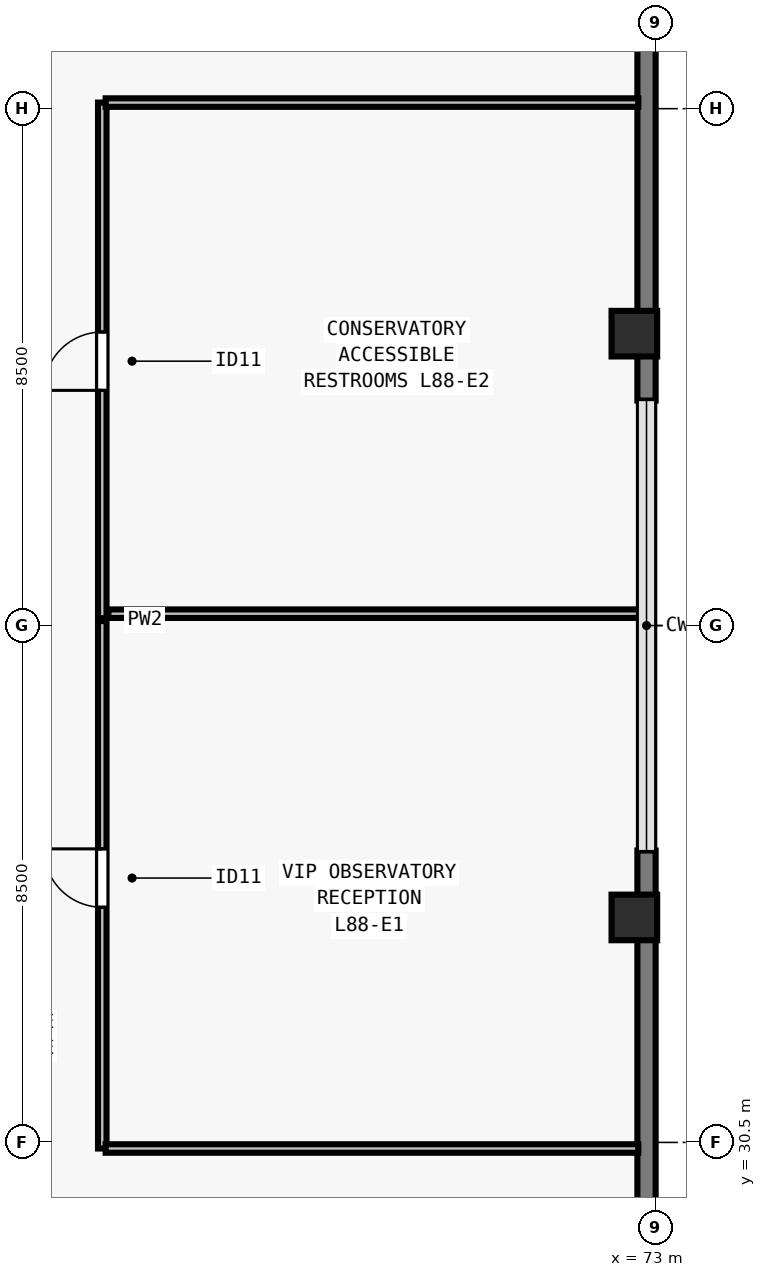
"""IFC4 building model, lengths in metres.
Left out: names, types, materials, properties, quantities, classifications, styles, units other than length and angle.
Written with IfcOpenShell. Run it as: python <this file> out.ifc"""

import sys

from ifc_helpers import new_model, si_unit, direction, frame, frame_2d, origin, origin_2d, place, context, subcontext, project, spatial, rectangle, extrude, element, fill, save


model = new_model("IFC4")
c1 = context("Model", 3, precision=1e-05, world=origin(), true_north=direction((0.0, 1.0)))
c2 = subcontext(c1, "Body", "Model", "MODEL_VIEW")
j1 = project(units=[si_unit("LENGTHUNIT", "METRE"), si_unit("PLANEANGLEUNIT", "RADIAN")], contexts=[c1])
p1 = place(None, origin())
s1 = spatial("IfcSite", under=j1, at=p1, CompositionType="ELEMENT")
p2 = place(p1, origin())
s2 = spatial("IfcBuilding", under=s1, at=p2, CompositionType="ELEMENT")
p3 = place(p2, frame((0.0, 0.0, 320.0)))
s3 = spatial("IfcBuildingStorey", under=s2, at=p3, CompositionType="ELEMENT", Elevation=320.0)
for number, where, z_axis, x_axis in (
    (1, (72.65, 34.2, 0.0), (0.0, 0.0, 1.0), (0.0, 1.0, 0.0)),
    (2, (72.65, 43.8, 0.0), (0.0, 0.0, 1.0), (0.0, 1.0, 0.0)),
):
    element("IfcColumn", number, at=place(p3, frame(where, z_axis=z_axis, x_axis=x_axis)), inside=s3, PredefinedType="COLUMN", context=c2, shape_type="SweptSolid", body=[
        extrude(rectangle(XDim=0.75, YDim=0.75, at=origin_2d()), origin(), (0.0, 0.0, 1.0), 4.5),
    ])
p4 = place(p3, frame((72.85, 54.5, 0.0), z_axis=(0.0, 0.0, 1.0), x_axis=(0.0, -1.0, 0.0)))
e3 = element("IfcWall", 3, at=p4, inside=s3, PredefinedType="SOLIDWALL", context=c2, shape_type="SweptSolid", body=[
    extrude(rectangle(XDim=11.8, YDim=0.3, at=frame_2d((5.9, 0.0))), origin(), (0.0, 0.0, 1.0), 4.25),
])
p5 = place(p3, frame((72.85, 35.3, 0.0), z_axis=(0.0, 0.0, 1.0), x_axis=(0.0, -1.0, 0.0)))
e4 = element("IfcWall", 4, at=p5, inside=s3, PredefinedType="SOLIDWALL", context=c2, shape_type="SweptSolid", body=[
    extrude(rectangle(XDim=11.522, YDim=0.3, at=frame_2d((5.761, 0.0))), origin(), (0.0, 0.0, 1.0), 4.25),
])
p6 = place(p3, frame((63.9, 30.4, 0.0), z_axis=(0.0, 0.0, 1.0), x_axis=(0.0, 1.0, 0.0)))
e5 = element("IfcWall", 5, at=p6, inside=s3, PredefinedType="PARTITIONING", context=c2, shape_type="SweptSolid", body=[
    extrude(rectangle(XDim=17.2, YDim=0.14, at=frame_2d((8.6, 0.0))), origin(), (0.0, 0.0, 1.0), 4.25),
])
p7 = place(p6, frame((3.968, 0.0, 0.0)))
e6 = element("IfcOpeningElement", 6, at=p7, cuts=e5, PredefinedType="OPENING", context=c2, shape_type="SweptSolid", body=[
    extrude(rectangle(XDim=0.96, YDim=2.12, at=frame_2d((0.48, 1.06))), frame((0.0, 0.08, 0.0), z_axis=(0.0, -1.0, 0.0), x_axis=(1.0, 0.0, 0.0)), (0.0, 0.0, 1.0), 0.16),
])
p8 = place(p6, frame((12.468, 0.0, 0.0)))
e7 = element("IfcOpeningElement", 7, at=p8, cuts=e5, PredefinedType="OPENING", context=c2, shape_type="SweptSolid", body=[
    extrude(rectangle(XDim=0.96, YDim=2.12, at=frame_2d((0.48, 1.06))), frame((0.0, 0.08, 0.0), z_axis=(0.0, -1.0, 0.0), x_axis=(1.0, 0.0, 0.0)), (0.0, 0.0, 1.0), 0.16),
])
for number, where, z_axis, x_axis in (
    (8, (63.955, 30.4, 0.0), (0.0, 0.0, 1.0), (1.0, 0.0, 0.0)),
    (9, (63.955, 47.6, 0.0), (0.0, 0.0, 1.0), (1.0, 0.0, 0.0)),
):
    element("IfcWall", number, at=place(p3, frame(where, z_axis=z_axis, x_axis=x_axis)), inside=s3, PredefinedType="PARTITIONING", context=c2, shape_type="SweptSolid", body=[
        extrude(rectangle(XDim=8.76, YDim=0.14, at=frame_2d((4.38, 0.0))), origin(), (0.0, 0.0, 1.0), 2.425),
    ])
p9 = place(p3, frame((64.0, 39.195, 0.0), z_axis=(0.0, 0.0, 1.0), x_axis=(1.0, 0.0, 0.0)))
e10 = element("IfcWall", 10, at=p9, inside=s3, PredefinedType="PARTITIONING", context=c2, shape_type="SweptSolid", body=[
    extrude(rectangle(XDim=8.83, YDim=0.14, at=frame_2d((4.415, 0.0))), origin(), (0.0, 0.0, 1.0), 4.25),
])
p10 = place(p7, origin())
e11 = element("IfcDoor", 11, at=p10, inside=s3, OperationType="SINGLE_SWING_RIGHT", PredefinedType="DOOR", context=c2, shape_type="SweptSolid", body=[
    extrude(rectangle(XDim=0.96, YDim=2.12, at=frame_2d((0.48, 1.06))), frame((0.0, 0.025, 0.0), z_axis=(0.0, -1.0, 0.0), x_axis=(1.0, 0.0, 0.0)), (0.0, 0.0, 1.0), 0.05),
])
fill(e6, e11)
p11 = place(p8, origin())
e12 = element("IfcDoor", 12, at=p11, inside=s3, OperationType="SINGLE_SWING_LEFT", PredefinedType="DOOR", context=c2, shape_type="SweptSolid", body=[
    extrude(rectangle(XDim=0.96, YDim=2.12, at=frame_2d((0.48, 1.06))), frame((0.0, 0.025, 0.0), z_axis=(0.0, -1.0, 0.0), x_axis=(1.0, 0.0, 0.0)), (0.0, 0.0, 1.0), 0.05),
])
fill(e7, e12)
save(model, sys.argv[1])
